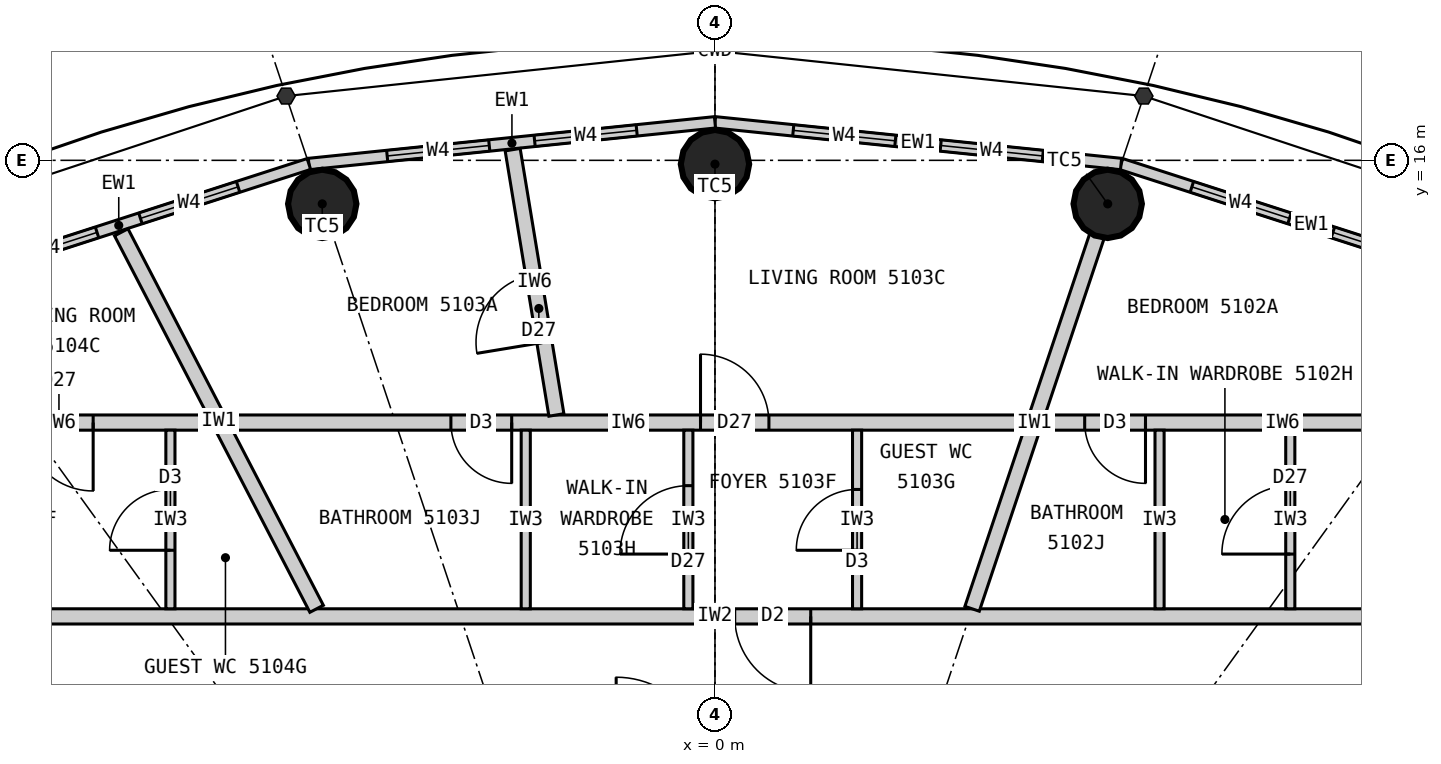
"""IFC4 building model, lengths in metres.
Left out: names, types, materials, properties, quantities, classifications, styles, units other than length and angle.
Written with IfcOpenShell. Run it as: python <this file> out.ifc"""

import sys

from ifc_helpers import new_model, si_unit, direction, frame, frame_2d, origin, origin_2d, place, context, subcontext, project, spatial, rectangle, circle, extrude, element, fill, save


model = new_model("IFC4")
c1 = context("Model", 3, precision=1e-05, world=origin(), true_north=direction((0.0, 1.0)))
c2 = subcontext(c1, "Body", "Model", "MODEL_VIEW")
j1 = project(units=[si_unit("LENGTHUNIT", "METRE"), si_unit("PLANEANGLEUNIT", "RADIAN")], contexts=[c1])
p1 = place(None, origin())
s1 = spatial("IfcSite", under=j1, at=p1, CompositionType="ELEMENT")
p2 = place(p1, origin())
s2 = spatial("IfcBuilding", under=s1, at=p2, CompositionType="ELEMENT")
p3 = place(p2, frame((0.0, 0.0, 192.9)))
s3 = spatial("IfcBuildingStorey", under=s2, at=p3, CompositionType="ELEMENT", Elevation=192.9)
for number, where, z_axis, x_axis in (
    (1, (5.167, 15.427, 0.0), (0.0, 0.0, 1.0), (1.0, 0.0, 0.0)),
    (2, (0.0, 15.95, 0.0), (0.0, 0.0, 1.0), (1.0, 0.0, 0.0)),
    (3, (-5.167, 15.427, 0.0), (0.0, 0.0, 1.0), (1.0, 0.0, 0.0)),
):
    element("IfcColumn", number, at=place(p3, frame(where, z_axis=z_axis, x_axis=x_axis)), inside=s3, PredefinedType="COLUMN", context=c2, shape_type="SweptSolid", body=[
        extrude(circle(Radius=0.45, at=origin_2d()), origin(), (0.0, 0.0, 1.0), 3.3),
    ])
p4 = place(p3, frame((10.346, 14.336, 0.0), z_axis=(0.0, 0.0, 1.0), x_axis=(-0.951644702515, 0.307200846638, 0.0)))
e4 = element("IfcWall", 4, at=p4, inside=s3, PredefinedType="ELEMENTEDWALL", context=c2, shape_type="SweptSolid", body=[
    extrude(rectangle(XDim=5.258, YDim=0.15, at=frame_2d((2.629, 0.0))), origin(), (0.0, 0.0, 1.0), 3.12),
])
p5 = place(p4, frame((0.979, 0.0, 0.9)))
e5 = element("IfcOpeningElement", 5, at=p5, cuts=e4, PredefinedType="OPENING", context=c2, shape_type="SweptSolid", body=[
    extrude(rectangle(XDim=1.35, YDim=1.9, at=frame_2d((0.675, 0.95))), frame((0.0, 0.085, 0.0), z_axis=(0.0, -1.0, 0.0), x_axis=(1.0, 0.0, 0.0)), (0.0, 0.0, 1.0), 0.17),
])
p6 = place(p4, frame((2.929, 0.0, 0.9)))
e6 = element("IfcOpeningElement", 6, at=p6, cuts=e4, PredefinedType="OPENING", context=c2, shape_type="SweptSolid", body=[
    extrude(rectangle(XDim=1.35, YDim=1.9, at=frame_2d((0.675, 0.95))), frame((0.0, 0.085, 0.0), z_axis=(0.0, -1.0, 0.0), x_axis=(1.0, 0.0, 0.0)), (0.0, 0.0, 1.0), 0.17),
])
p7 = place(p3, frame((5.343, 15.952, 0.0), z_axis=(0.0, 0.0, 1.0), x_axis=(-0.994774574972, 0.102095763818, 0.0)))
e7 = element("IfcWall", 7, at=p7, inside=s3, PredefinedType="ELEMENTEDWALL", context=c2, shape_type="SweptSolid", body=[
    extrude(rectangle(XDim=5.371, YDim=0.15, at=frame_2d((2.686, 0.0))), origin(), (0.0, 0.0, 1.0), 3.12),
])
p8 = place(p7, frame((1.035, 0.0, 0.9)))
e8 = element("IfcOpeningElement", 8, at=p8, cuts=e7, PredefinedType="OPENING", context=c2, shape_type="SweptSolid", body=[
    extrude(rectangle(XDim=1.35, YDim=1.9, at=frame_2d((0.675, 0.95))), frame((0.0, 0.085, 0.0), z_axis=(0.0, -1.0, 0.0), x_axis=(1.0, 0.0, 0.0)), (0.0, 0.0, 1.0), 0.17),
])
p9 = place(p7, frame((2.985, 0.0, 0.9)))
e9 = element("IfcOpeningElement", 9, at=p9, cuts=e7, PredefinedType="OPENING", context=c2, shape_type="SweptSolid", body=[
    extrude(rectangle(XDim=1.35, YDim=1.9, at=frame_2d((0.675, 0.95))), frame((0.0, 0.085, 0.0), z_axis=(0.0, -1.0, 0.0), x_axis=(1.0, 0.0, 0.0)), (0.0, 0.0, 1.0), 0.17),
])
p10 = place(p3, frame((0.0, 16.5, 0.0), z_axis=(0.0, 0.0, 1.0), x_axis=(-0.994774574972, -0.102095763818, 0.0)))
e10 = element("IfcWall", 10, at=p10, inside=s3, PredefinedType="ELEMENTEDWALL", context=c2, shape_type="SweptSolid", body=[
    extrude(rectangle(XDim=5.371, YDim=0.15, at=frame_2d((2.686, 0.0))), origin(), (0.0, 0.0, 1.0), 3.12),
])
p11 = place(p10, frame((1.035, 0.0, 0.9)))
e11 = element("IfcOpeningElement", 11, at=p11, cuts=e10, PredefinedType="OPENING", context=c2, shape_type="SweptSolid", body=[
    extrude(rectangle(XDim=1.35, YDim=1.9, at=frame_2d((0.675, 0.95))), frame((0.0, 0.085, 0.0), z_axis=(0.0, -1.0, 0.0), x_axis=(1.0, 0.0, 0.0)), (0.0, 0.0, 1.0), 0.17),
])
p12 = place(p10, frame((2.985, 0.0, 0.9)))
e12 = element("IfcOpeningElement", 12, at=p12, cuts=e10, PredefinedType="OPENING", context=c2, shape_type="SweptSolid", body=[
    extrude(rectangle(XDim=1.35, YDim=1.9, at=frame_2d((0.675, 0.95))), frame((0.0, 0.085, 0.0), z_axis=(0.0, -1.0, 0.0), x_axis=(1.0, 0.0, 0.0)), (0.0, 0.0, 1.0), 0.17),
])
p13 = place(p3, frame((-5.343, 15.952, 0.0), z_axis=(0.0, 0.0, 1.0), x_axis=(-0.951644702515, -0.307200846638, 0.0)))
e13 = element("IfcWall", 13, at=p13, inside=s3, PredefinedType="ELEMENTEDWALL", context=c2, shape_type="SweptSolid", body=[
    extrude(rectangle(XDim=5.258, YDim=0.15, at=frame_2d((2.629, 0.0))), origin(), (0.0, 0.0, 1.0), 3.12),
])
p14 = place(p13, frame((0.979, 0.0, 0.9)))
e14 = element("IfcOpeningElement", 14, at=p14, cuts=e13, PredefinedType="OPENING", context=c2, shape_type="SweptSolid", body=[
    extrude(rectangle(XDim=1.35, YDim=1.9, at=frame_2d((0.675, 0.95))), frame((0.0, 0.085, 0.0), z_axis=(0.0, -1.0, 0.0), x_axis=(1.0, 0.0, 0.0)), (0.0, 0.0, 1.0), 0.17),
])
p15 = place(p13, frame((2.929, 0.0, 0.9)))
e15 = element("IfcOpeningElement", 15, at=p15, cuts=e13, PredefinedType="OPENING", context=c2, shape_type="SweptSolid", body=[
    extrude(rectangle(XDim=1.35, YDim=1.9, at=frame_2d((0.675, 0.95))), frame((0.0, 0.085, 0.0), z_axis=(0.0, -1.0, 0.0), x_axis=(1.0, 0.0, 0.0)), (0.0, 0.0, 1.0), 0.17),
])
p16 = place(p3, frame((-11.1, 10.0, 0.0), z_axis=(0.0, 0.0, 1.0), x_axis=(1.0, 0.0, 0.0)))
e16 = element("IfcWall", 16, at=p16, inside=s3, PredefinedType="PARTITIONING", context=c2, shape_type="SweptSolid", body=[
    extrude(rectangle(XDim=22.2, YDim=0.2, at=frame_2d((11.1, 0.0))), origin(), (0.0, 0.0, 1.0), 3.12),
])
p17 = place(p16, frame((11.36, 0.0, 0.0)))
e17 = element("IfcOpeningElement", 17, at=p17, cuts=e16, PredefinedType="OPENING", context=c2, shape_type="SweptSolid", body=[
    extrude(rectangle(XDim=1.0, YDim=2.2, at=frame_2d((0.5, 1.1))), frame((0.0, 0.11, 0.0), z_axis=(0.0, -1.0, 0.0), x_axis=(1.0, 0.0, 0.0)), (0.0, 0.0, 1.0), 0.22),
])
p18 = place(p16, frame((0.975, 0.0, 0.0)))
e18 = element("IfcOpeningElement", 18, at=p18, cuts=e16, PredefinedType="OPENING", context=c2, shape_type="SweptSolid", body=[
    extrude(rectangle(XDim=1.0, YDim=2.2, at=frame_2d((0.5, 1.1))), frame((0.0, 0.11, 0.0), z_axis=(0.0, -1.0, 0.0), x_axis=(1.0, 0.0, 0.0)), (0.0, 0.0, 1.0), 0.22),
])
p19 = place(p3, frame((3.383, 10.1, 0.0), z_axis=(0.0, 0.0, 1.0), x_axis=(0.317602151035, 0.948224063003, 0.0)))
e19 = element("IfcWall", 19, at=p19, inside=s3, PredefinedType="PARTITIONING", context=c2, shape_type="SweptSolid", body=[
    extrude(rectangle(XDim=5.168, YDim=0.2, at=frame_2d((2.584, 0.0))), origin(), (0.0, 0.0, 1.0), 2.27),
])
p20 = place(p3, frame((-5.241, 10.1, 0.0), z_axis=(0.0, 0.0, 1.0), x_axis=(-0.460603196597, 0.887606160008, 0.0)))
e20 = element("IfcWall", 20, at=p20, inside=s3, PredefinedType="PARTITIONING", context=c2, shape_type="SweptSolid", body=[
    extrude(rectangle(XDim=5.58, YDim=0.2, at=frame_2d((2.79, 0.0))), origin(), (0.0, 0.0, 1.0), 3.12),
])
p21 = place(p3, frame((10.609, 12.55, 0.0), z_axis=(0.0, 0.0, 1.0), x_axis=(-1.0, 0.0, 0.0)))
e21 = element("IfcWall", 21, at=p21, inside=s3, PredefinedType="PARTITIONING", context=c2, shape_type="SweptSolid", body=[
    extrude(rectangle(XDim=6.284, YDim=0.2, at=frame_2d((3.142, 0.0))), origin(), (0.0, 0.0, 1.0), 3.12),
])
p22 = place(p21, frame((4.944, 0.0, 0.0)))
e22 = element("IfcOpeningElement", 22, at=p22, cuts=e21, PredefinedType="OPENING", context=c2, shape_type="SweptSolid", body=[
    extrude(rectangle(XDim=0.8, YDim=2.1, at=frame_2d((0.4, 1.05))), frame((0.0, 0.11, 0.0), z_axis=(0.0, -1.0, 0.0), x_axis=(1.0, 0.0, 0.0)), (0.0, 0.0, 1.0), 0.22),
])
p23 = place(p3, frame((7.569, 10.1, 0.0), z_axis=(0.0, 0.0, 1.0), x_axis=(0.0, 1.0, 0.0)))
e23 = element("IfcWall", 23, at=p23, inside=s3, PredefinedType="PARTITIONING", context=c2, shape_type="SweptSolid", body=[
    extrude(rectangle(XDim=2.35, YDim=0.12, at=frame_2d((1.175, 0.0))), origin(), (0.0, 0.0, 1.0), 3.12),
])
p24 = place(p23, frame((0.72, 0.0, 0.0)))
e24 = element("IfcOpeningElement", 24, at=p24, cuts=e23, PredefinedType="OPENING", context=c2, shape_type="SweptSolid", body=[
    extrude(rectangle(XDim=0.9, YDim=2.1, at=frame_2d((0.45, 1.05))), frame((0.0, 0.07, 0.0), z_axis=(0.0, -1.0, 0.0), x_axis=(1.0, 0.0, 0.0)), (0.0, 0.0, 1.0), 0.14),
])
p25 = place(p3, frame((5.849, 10.1, 0.0), z_axis=(0.0, 0.0, 1.0), x_axis=(0.0, 1.0, 0.0)))
e25 = element("IfcWall", 25, at=p25, inside=s3, PredefinedType="PARTITIONING", context=c2, shape_type="SweptSolid", body=[
    extrude(rectangle(XDim=2.35, YDim=0.12, at=frame_2d((1.175, 0.0))), origin(), (0.0, 0.0, 1.0), 3.12),
])
p26 = place(p3, frame((4.082, 12.55, 0.0), z_axis=(0.0, 0.0, 1.0), x_axis=(-1.0, 0.0, 0.0)))
e26 = element("IfcWall", 26, at=p26, inside=s3, PredefinedType="PARTITIONING", context=c2, shape_type="SweptSolid", body=[
    extrude(rectangle(XDim=10.446, YDim=0.2, at=frame_2d((5.223, 0.0))), origin(), (0.0, 0.0, 1.0), 3.12),
])
p27 = place(p26, frame((6.757, 0.0, 0.0)))
e27 = element("IfcOpeningElement", 27, at=p27, cuts=e26, PredefinedType="OPENING", context=c2, shape_type="SweptSolid", body=[
    extrude(rectangle(XDim=0.8, YDim=2.1, at=frame_2d((0.4, 1.05))), frame((0.0, 0.11, 0.0), z_axis=(0.0, -1.0, 0.0), x_axis=(1.0, 0.0, 0.0)), (0.0, 0.0, 1.0), 0.22),
])
p28 = place(p26, frame((3.372, 0.0, 0.0)))
e28 = element("IfcOpeningElement", 28, at=p28, cuts=e26, PredefinedType="OPENING", context=c2, shape_type="SweptSolid", body=[
    extrude(rectangle(XDim=0.9, YDim=2.1, at=frame_2d((0.45, 1.05))), frame((0.0, 0.11, 0.0), z_axis=(0.0, -1.0, 0.0), x_axis=(1.0, 0.0, 0.0)), (0.0, 0.0, 1.0), 0.22),
])
p29 = place(p3, frame((-2.086, 12.65, 0.0), z_axis=(0.0, 0.0, 1.0), x_axis=(-0.162664077359, 0.986681507852, 0.0)))
e29 = element("IfcWall", 29, at=p29, inside=s3, PredefinedType="PARTITIONING", context=c2, shape_type="SweptSolid", body=[
    extrude(rectangle(XDim=3.538, YDim=0.2, at=frame_2d((1.769, 0.0))), origin(), (0.0, 0.0, 1.0), 3.12),
])
p30 = place(p29, frame((0.97, 0.0, 0.0)))
e30 = element("IfcOpeningElement", 30, at=p30, cuts=e29, PredefinedType="OPENING", context=c2, shape_type="SweptSolid", body=[
    extrude(rectangle(XDim=0.9, YDim=2.1, at=frame_2d((0.45, 1.05))), frame((0.0, 0.11, 0.0), z_axis=(0.0, -1.0, 0.0), x_axis=(1.0, 0.0, 0.0)), (0.0, 0.0, 1.0), 0.22),
])
p31 = place(p3, frame((1.87, 10.1, 0.0), z_axis=(0.0, 0.0, 1.0), x_axis=(0.0, 1.0, 0.0)))
e31 = element("IfcWall", 31, at=p31, inside=s3, PredefinedType="PARTITIONING", context=c2, shape_type="SweptSolid", body=[
    extrude(rectangle(XDim=2.35, YDim=0.12, at=frame_2d((1.175, 0.0))), origin(), (0.0, 0.0, 1.0), 3.12),
])
p32 = place(p31, frame((0.77, 0.0, 0.0)))
e32 = element("IfcOpeningElement", 32, at=p32, cuts=e31, PredefinedType="OPENING", context=c2, shape_type="SweptSolid", body=[
    extrude(rectangle(XDim=0.8, YDim=2.1, at=frame_2d((0.4, 1.05))), frame((0.0, 0.07, 0.0), z_axis=(0.0, -1.0, 0.0), x_axis=(1.0, 0.0, 0.0)), (0.0, 0.0, 1.0), 0.14),
])
p33 = place(p3, frame((-0.35, 10.1, 0.0), z_axis=(0.0, 0.0, 1.0), x_axis=(0.0, 1.0, 0.0)))
e33 = element("IfcWall", 33, at=p33, inside=s3, PredefinedType="PARTITIONING", context=c2, shape_type="SweptSolid", body=[
    extrude(rectangle(XDim=2.35, YDim=0.12, at=frame_2d((1.175, 0.0))), origin(), (0.0, 0.0, 1.0), 3.12),
])
p34 = place(p33, frame((0.72, 0.0, 0.0)))
e34 = element("IfcOpeningElement", 34, at=p34, cuts=e33, PredefinedType="OPENING", context=c2, shape_type="SweptSolid", body=[
    extrude(rectangle(XDim=0.9, YDim=2.1, at=frame_2d((0.45, 1.05))), frame((0.0, 0.07, 0.0), z_axis=(0.0, -1.0, 0.0), x_axis=(1.0, 0.0, 0.0)), (0.0, 0.0, 1.0), 0.14),
])
p35 = place(p3, frame((-2.49, 10.1, 0.0), z_axis=(0.0, 0.0, 1.0), x_axis=(0.0, 1.0, 0.0)))
e35 = element("IfcWall", 35, at=p35, inside=s3, PredefinedType="PARTITIONING", context=c2, shape_type="SweptSolid", body=[
    extrude(rectangle(XDim=2.35, YDim=0.12, at=frame_2d((1.175, 0.0))), origin(), (0.0, 0.0, 1.0), 3.12),
])
p36 = place(p3, frame((-6.661, 12.55, 0.0), z_axis=(0.0, 0.0, 1.0), x_axis=(-1.0, 0.0, 0.0)))
e36 = element("IfcWall", 36, at=p36, inside=s3, PredefinedType="PARTITIONING", context=c2, shape_type="SweptSolid", body=[
    extrude(rectangle(XDim=3.947, YDim=0.2, at=frame_2d((1.974, 0.0))), origin(), (0.0, 0.0, 1.0), 3.12),
])
p37 = place(p36, frame((1.52, 0.0, 0.0)))
e37 = element("IfcOpeningElement", 37, at=p37, cuts=e36, PredefinedType="OPENING", context=c2, shape_type="SweptSolid", body=[
    extrude(rectangle(XDim=0.9, YDim=2.1, at=frame_2d((0.45, 1.05))), frame((0.0, 0.11, 0.0), z_axis=(0.0, -1.0, 0.0), x_axis=(1.0, 0.0, 0.0)), (0.0, 0.0, 1.0), 0.22),
])
p38 = place(p3, frame((-7.165, 10.1, 0.0), z_axis=(0.0, 0.0, 1.0), x_axis=(0.0, 1.0, 0.0)))
e38 = element("IfcWall", 38, at=p38, inside=s3, PredefinedType="PARTITIONING", context=c2, shape_type="SweptSolid", body=[
    extrude(rectangle(XDim=2.35, YDim=0.12, at=frame_2d((1.175, 0.0))), origin(), (0.0, 0.0, 1.0), 3.12),
])
p39 = place(p38, frame((0.77, 0.0, 0.0)))
e39 = element("IfcOpeningElement", 39, at=p39, cuts=e38, PredefinedType="OPENING", context=c2, shape_type="SweptSolid", body=[
    extrude(rectangle(XDim=0.8, YDim=2.1, at=frame_2d((0.4, 1.05))), frame((0.0, 0.07, 0.0), z_axis=(0.0, -1.0, 0.0), x_axis=(1.0, 0.0, 0.0)), (0.0, 0.0, 1.0), 0.14),
])
p40 = place(p5, origin())
e40 = element("IfcWindow", 40, at=p40, inside=s3, PartitioningType="SINGLE_PANEL", PredefinedType="WINDOW", context=c2, shape_type="SweptSolid", body=[
    extrude(rectangle(XDim=1.35, YDim=1.9, at=frame_2d((0.675, 0.95))), frame((0.0, 0.03, 0.0), z_axis=(0.0, -1.0, 0.0), x_axis=(1.0, 0.0, 0.0)), (0.0, 0.0, 1.0), 0.06),
])
fill(e5, e40)
p41 = place(p6, origin())
e41 = element("IfcWindow", 41, at=p41, inside=s3, PartitioningType="SINGLE_PANEL", PredefinedType="WINDOW", context=c2, shape_type="SweptSolid", body=[
    extrude(rectangle(XDim=1.35, YDim=1.9, at=frame_2d((0.675, 0.95))), frame((0.0, 0.03, 0.0), z_axis=(0.0, -1.0, 0.0), x_axis=(1.0, 0.0, 0.0)), (0.0, 0.0, 1.0), 0.06),
])
fill(e6, e41)
p42 = place(p8, origin())
e42 = element("IfcWindow", 42, at=p42, inside=s3, PartitioningType="SINGLE_PANEL", PredefinedType="WINDOW", context=c2, shape_type="SweptSolid", body=[
    extrude(rectangle(XDim=1.35, YDim=1.9, at=frame_2d((0.675, 0.95))), frame((0.0, 0.03, 0.0), z_axis=(0.0, -1.0, 0.0), x_axis=(1.0, 0.0, 0.0)), (0.0, 0.0, 1.0), 0.06),
])
fill(e8, e42)
p43 = place(p9, origin())
e43 = element("IfcWindow", 43, at=p43, inside=s3, PartitioningType="SINGLE_PANEL", PredefinedType="WINDOW", context=c2, shape_type="SweptSolid", body=[
    extrude(rectangle(XDim=1.35, YDim=1.9, at=frame_2d((0.675, 0.95))), frame((0.0, 0.03, 0.0), z_axis=(0.0, -1.0, 0.0), x_axis=(1.0, 0.0, 0.0)), (0.0, 0.0, 1.0), 0.06),
])
fill(e9, e43)
p44 = place(p11, origin())
e44 = element("IfcWindow", 44, at=p44, inside=s3, PartitioningType="SINGLE_PANEL", PredefinedType="WINDOW", context=c2, shape_type="SweptSolid", body=[
    extrude(rectangle(XDim=1.35, YDim=1.9, at=frame_2d((0.675, 0.95))), frame((0.0, 0.03, 0.0), z_axis=(0.0, -1.0, 0.0), x_axis=(1.0, 0.0, 0.0)), (0.0, 0.0, 1.0), 0.06),
])
fill(e11, e44)
p45 = place(p12, origin())
e45 = element("IfcWindow", 45, at=p45, inside=s3, PartitioningType="SINGLE_PANEL", PredefinedType="WINDOW", context=c2, shape_type="SweptSolid", body=[
    extrude(rectangle(XDim=1.35, YDim=1.9, at=frame_2d((0.675, 0.95))), frame((0.0, 0.03, 0.0), z_axis=(0.0, -1.0, 0.0), x_axis=(1.0, 0.0, 0.0)), (0.0, 0.0, 1.0), 0.06),
])
fill(e12, e45)
p46 = place(p14, origin())
e46 = element("IfcWindow", 46, at=p46, inside=s3, PartitioningType="SINGLE_PANEL", PredefinedType="WINDOW", context=c2, shape_type="SweptSolid", body=[
    extrude(rectangle(XDim=1.35, YDim=1.9, at=frame_2d((0.675, 0.95))), frame((0.0, 0.03, 0.0), z_axis=(0.0, -1.0, 0.0), x_axis=(1.0, 0.0, 0.0)), (0.0, 0.0, 1.0), 0.06),
])
fill(e14, e46)
p47 = place(p15, origin())
e47 = element("IfcWindow", 47, at=p47, inside=s3, PartitioningType="SINGLE_PANEL", PredefinedType="WINDOW", context=c2, shape_type="SweptSolid", body=[
    extrude(rectangle(XDim=1.35, YDim=1.9, at=frame_2d((0.675, 0.95))), frame((0.0, 0.03, 0.0), z_axis=(0.0, -1.0, 0.0), x_axis=(1.0, 0.0, 0.0)), (0.0, 0.0, 1.0), 0.06),
])
fill(e15, e47)
p48 = place(p24, origin())
e48 = element("IfcDoor", 48, at=p48, inside=s3, OperationType="SINGLE_SWING_LEFT", PredefinedType="DOOR", context=c2, shape_type="SweptSolid", body=[
    extrude(rectangle(XDim=0.9, YDim=2.1, at=frame_2d((0.45, 1.05))), frame((0.0, 0.025, 0.0), z_axis=(0.0, -1.0, 0.0), x_axis=(1.0, 0.0, 0.0)), (0.0, 0.0, 1.0), 0.05),
])
fill(e24, e48)
p49 = place(p22, origin())
e49 = element("IfcDoor", 49, at=p49, inside=s3, OperationType="SINGLE_SWING_LEFT", PredefinedType="DOOR", context=c2, shape_type="SweptSolid", body=[
    extrude(rectangle(XDim=0.8, YDim=2.1, at=frame_2d((0.4, 1.05))), frame((0.0, 0.025, 0.0), z_axis=(0.0, -1.0, 0.0), x_axis=(1.0, 0.0, 0.0)), (0.0, 0.0, 1.0), 0.05),
])
fill(e22, e49)
p50 = place(p17, origin())
e50 = element("IfcDoor", 50, at=p50, inside=s3, OperationType="SINGLE_SWING_RIGHT", PredefinedType="DOOR", context=c2, shape_type="SweptSolid", body=[
    extrude(rectangle(XDim=1.0, YDim=2.2, at=frame_2d((0.5, 1.1))), frame((0.0, 0.025, 0.0), z_axis=(0.0, -1.0, 0.0), x_axis=(1.0, 0.0, 0.0)), (0.0, 0.0, 1.0), 0.05),
])
fill(e17, e50)
p51 = place(p32, origin())
e51 = element("IfcDoor", 51, at=p51, inside=s3, OperationType="SINGLE_SWING_LEFT", PredefinedType="DOOR", context=c2, shape_type="SweptSolid", body=[
    extrude(rectangle(XDim=0.8, YDim=2.1, at=frame_2d((0.4, 1.05))), frame((0.0, 0.025, 0.0), z_axis=(0.0, -1.0, 0.0), x_axis=(1.0, 0.0, 0.0)), (0.0, 0.0, 1.0), 0.05),
])
fill(e32, e51)
p52 = place(p34, origin())
e52 = element("IfcDoor", 52, at=p52, inside=s3, OperationType="SINGLE_SWING_LEFT", PredefinedType="DOOR", context=c2, shape_type="SweptSolid", body=[
    extrude(rectangle(XDim=0.9, YDim=2.1, at=frame_2d((0.45, 1.05))), frame((0.0, 0.025, 0.0), z_axis=(0.0, -1.0, 0.0), x_axis=(1.0, 0.0, 0.0)), (0.0, 0.0, 1.0), 0.05),
])
fill(e34, e52)
p53 = place(p27, origin())
e53 = element("IfcDoor", 53, at=p53, inside=s3, OperationType="SINGLE_SWING_LEFT", PredefinedType="DOOR", context=c2, shape_type="SweptSolid", body=[
    extrude(rectangle(XDim=0.8, YDim=2.1, at=frame_2d((0.4, 1.05))), frame((0.0, 0.025, 0.0), z_axis=(0.0, -1.0, 0.0), x_axis=(1.0, 0.0, 0.0)), (0.0, 0.0, 1.0), 0.05),
])
fill(e27, e53)
p54 = place(p28, origin())
e54 = element("IfcDoor", 54, at=p54, inside=s3, OperationType="SINGLE_SWING_RIGHT", PredefinedType="DOOR", context=c2, shape_type="SweptSolid", body=[
    extrude(rectangle(XDim=0.9, YDim=2.1, at=frame_2d((0.45, 1.05))), frame((0.0, 0.025, 0.0), z_axis=(0.0, -1.0, 0.0), x_axis=(1.0, 0.0, 0.0)), (0.0, 0.0, 1.0), 0.05),
])
fill(e28, e54)
p55 = place(p30, origin())
e55 = element("IfcDoor", 55, at=p55, inside=s3, OperationType="SINGLE_SWING_LEFT", PredefinedType="DOOR", context=c2, shape_type="SweptSolid", body=[
    extrude(rectangle(XDim=0.9, YDim=2.1, at=frame_2d((0.45, 1.05))), frame((0.0, 0.025, 0.0), z_axis=(0.0, -1.0, 0.0), x_axis=(1.0, 0.0, 0.0)), (0.0, 0.0, 1.0), 0.05),
])
fill(e30, e55)
p56 = place(p39, origin())
e56 = element("IfcDoor", 56, at=p56, inside=s3, OperationType="SINGLE_SWING_LEFT", PredefinedType="DOOR", context=c2, shape_type="SweptSolid", body=[
    extrude(rectangle(XDim=0.8, YDim=2.1, at=frame_2d((0.4, 1.05))), frame((0.0, 0.025, 0.0), z_axis=(0.0, -1.0, 0.0), x_axis=(1.0, 0.0, 0.0)), (0.0, 0.0, 1.0), 0.05),
])
fill(e39, e56)
p57 = place(p37, origin())
e57 = element("IfcDoor", 57, at=p57, inside=s3, OperationType="SINGLE_SWING_LEFT", PredefinedType="DOOR", context=c2, shape_type="SweptSolid", body=[
    extrude(rectangle(XDim=0.9, YDim=2.1, at=frame_2d((0.45, 1.05))), frame((0.0, 0.025, 0.0), z_axis=(0.0, -1.0, 0.0), x_axis=(1.0, 0.0, 0.0)), (0.0, 0.0, 1.0), 0.05),
])
fill(e37, e57)
save(model, sys.argv[1])
